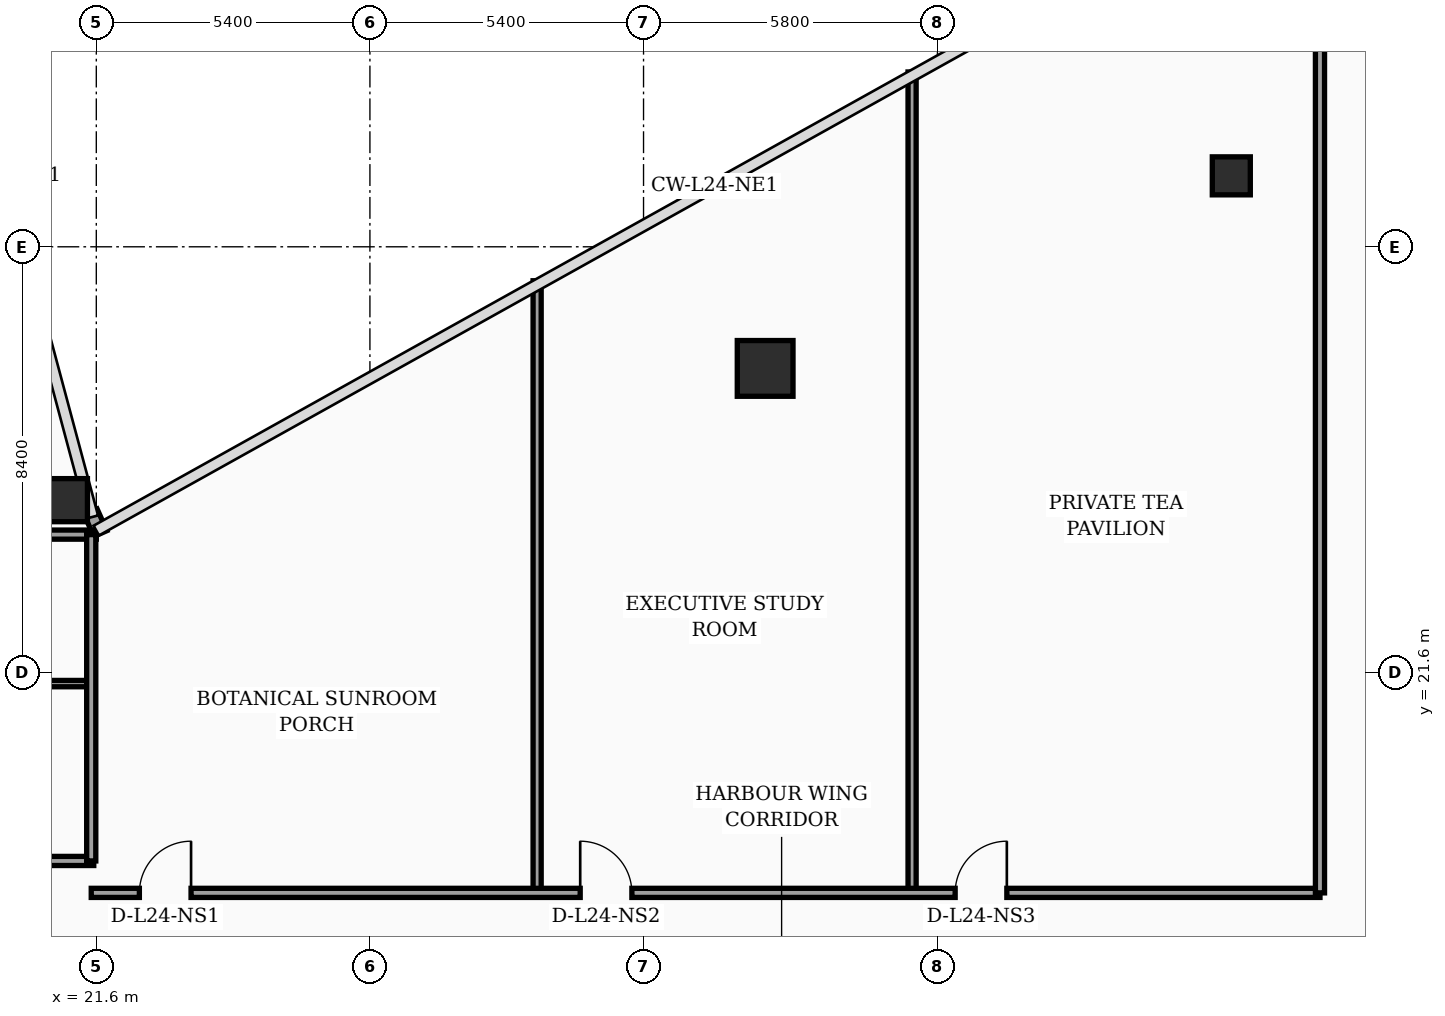
"""IFC4 building model, lengths in metres.
Left out: names, types, materials, properties, quantities, classifications, styles, units other than length and angle.
Written with IfcOpenShell. Run it as: python <this file> out.ifc"""

import sys

from ifc_helpers import new_model, si_unit, direction, frame, frame_2d, origin, origin_2d, place, context, subcontext, project, spatial, rectangle, hollow_rectangle, circle, extrude, element, fill, save


model = new_model("IFC4")
c1 = context("Model", 3, precision=1e-05, world=origin(), true_north=direction((0.0, 1.0)))
c2 = subcontext(c1, "Body", "Model", "MODEL_VIEW")
j1 = project(units=[si_unit("LENGTHUNIT", "METRE"), si_unit("PLANEANGLEUNIT", "RADIAN")], contexts=[c1])
p1 = place(None, origin())
s1 = spatial("IfcSite", under=j1, at=p1, CompositionType="ELEMENT")
p2 = place(p1, origin())
s2 = spatial("IfcBuilding", under=s1, at=p2, CompositionType="ELEMENT")
p3 = place(p2, frame((0.0, 0.0, 101.2)))
s3 = spatial("IfcBuildingStorey", under=s2, at=p3, CompositionType="ELEMENT", Elevation=101.2)
p4 = place(p3, frame((21.0, 25.0, 0.0), z_axis=(0.0, 0.0, 1.0), x_axis=(1.0, 0.0, 0.0)))
e1 = element("IfcColumn", 1, at=p4, inside=s3, PredefinedType="COLUMN", context=c2, shape_type="SweptSolid", body=[
    extrude(hollow_rectangle(XDim=0.85, YDim=0.85, WallThickness=0.036, at=origin_2d()), origin(), (0.0, 0.0, 1.0), 3.56),
])
p5 = place(p3, frame((34.8, 27.6, 0.0), z_axis=(0.0, 0.0, 1.0), x_axis=(1.0, 0.0, 0.0)))
e2 = element("IfcColumn", 2, at=p5, inside=s3, PredefinedType="COLUMN", context=c2, shape_type="SweptSolid", body=[
    extrude(circle(Radius=0.55, at=origin_2d()), origin(), (0.0, 0.0, 1.0), 3.56),
])
p6 = place(p3, frame((44.0, 31.4, 0.0), z_axis=(0.0, 0.0, 1.0), x_axis=(1.0, 0.0, 0.0)))
e3 = element("IfcColumn", 3, at=p6, inside=s3, PredefinedType="COLUMN", context=c2, shape_type="SweptSolid", body=[
    extrude(hollow_rectangle(XDim=0.75, YDim=0.75, WallThickness=0.032, at=origin_2d()), origin(), (0.0, 0.0, 1.0), 3.56),
])
p7 = place(p3, frame((21.68, 24.34, 0.0), z_axis=(0.0, 0.0, 1.0), x_axis=(-0.40758134973, 0.913168901875, 0.0)))
e4 = element("IfcWall", 4, at=p7, inside=s3, PredefinedType="SOLIDWALL", context=c2, shape_type="SweptSolid", body=[
    extrude(rectangle(XDim=0.471, YDim=0.28, at=frame_2d((0.235, 0.0))), origin(), (0.0, 0.0, 1.0), 3.56),
])
p8 = place(p3, frame((17.65, 17.88, 0.0), z_axis=(0.0, 0.0, 1.0), x_axis=(1.0, 0.0, 0.0)))
e5 = element("IfcWall", 5, at=p8, inside=s3, PredefinedType="PARTITIONING", context=c2, shape_type="SweptSolid", body=[
    extrude(rectangle(XDim=3.9, YDim=0.18, at=frame_2d((1.95, 0.0))), origin(), (0.0, 0.0, 1.0), 3.09),
])
p9 = place(p3, frame((17.65, 21.38, 0.0), z_axis=(0.0, 0.0, 1.0), x_axis=(1.0, 0.0, 0.0)))
e6 = element("IfcWall", 6, at=p9, inside=s3, PredefinedType="PARTITIONING", context=c2, shape_type="SweptSolid", body=[
    extrude(rectangle(XDim=3.9, YDim=0.125, at=frame_2d((1.95, 0.0))), origin(), (0.0, 0.0, 1.0), 3.56),
])
p10 = place(p3, frame((17.65, 24.32, 0.0), z_axis=(0.0, 0.0, 1.0), x_axis=(1.0, 0.0, 0.0)))
e7 = element("IfcWall", 7, at=p10, inside=s3, PredefinedType="PARTITIONING", context=c2, shape_type="SweptSolid", body=[
    extrude(rectangle(XDim=3.95, YDim=0.18, at=frame_2d((1.975, 0.0))), origin(), (0.0, 0.0, 1.0), 3.56),
])
p11 = place(p3, frame((21.5, 17.88, 0.0), z_axis=(0.0, 0.0, 1.0), x_axis=(0.0, 1.0, 0.0)))
e8 = element("IfcWall", 8, at=p11, inside=s3, PredefinedType="PARTITIONING", context=c2, shape_type="SweptSolid", body=[
    extrude(rectangle(XDim=6.44, YDim=0.18, at=frame_2d((3.22, 0.0))), origin(), (0.0, 0.0, 1.0), 3.09),
])
p12 = place(p3, frame((30.3, 17.25, 0.0), z_axis=(0.0, 0.0, 1.0), x_axis=(0.0, 1.0, 0.0)))
e9 = element("IfcWall", 9, at=p12, inside=s3, PredefinedType="PARTITIONING", context=c2, shape_type="SweptSolid", body=[
    extrude(rectangle(XDim=12.08, YDim=0.16, at=frame_2d((6.04, 0.0))), origin(), (0.0, 0.0, 1.0), 2.84),
])
p13 = place(p3, frame((37.7, 17.25, 0.0), z_axis=(0.0, 0.0, 1.0), x_axis=(0.0, 1.0, 0.0)))
e10 = element("IfcWall", 10, at=p13, inside=s3, PredefinedType="PARTITIONING", context=c2, shape_type="SweptSolid", body=[
    extrude(rectangle(XDim=16.2, YDim=0.16, at=frame_2d((8.1, 0.0))), origin(), (0.0, 0.0, 1.0), 2.84),
])
p14 = place(p3, frame((21.5, 17.25, 0.0), z_axis=(0.0, 0.0, 1.0), x_axis=(1.0, 0.0, 0.0)))
e11 = element("IfcWall", 11, at=p14, inside=s3, PredefinedType="PARTITIONING", context=c2, shape_type="SweptSolid", body=[
    extrude(rectangle(XDim=24.25, YDim=0.18, at=frame_2d((12.125, 0.0))), origin(), (0.0, 0.0, 1.0), 2.84),
])
p15 = place(p14, frame((0.95, 0.0, 0.0)))
e12 = element("IfcOpeningElement", 12, at=p15, cuts=e11, PredefinedType="OPENING", context=c2, shape_type="SweptSolid", body=[
    extrude(rectangle(XDim=1.02, YDim=2.2, at=frame_2d((0.51, 1.1))), frame((0.0, 0.1, 0.0), z_axis=(0.0, -1.0, 0.0), x_axis=(1.0, 0.0, 0.0)), (0.0, 0.0, 1.0), 0.2),
])
p16 = place(p14, frame((9.65, 0.0, 0.0)))
e13 = element("IfcOpeningElement", 13, at=p16, cuts=e11, PredefinedType="OPENING", context=c2, shape_type="SweptSolid", body=[
    extrude(rectangle(XDim=1.02, YDim=2.2, at=frame_2d((0.51, 1.1))), frame((0.0, 0.1, 0.0), z_axis=(0.0, -1.0, 0.0), x_axis=(1.0, 0.0, 0.0)), (0.0, 0.0, 1.0), 0.2),
])
p17 = place(p14, frame((17.05, 0.0, 0.0)))
e14 = element("IfcOpeningElement", 14, at=p17, cuts=e11, PredefinedType="OPENING", context=c2, shape_type="SweptSolid", body=[
    extrude(rectangle(XDim=1.02, YDim=2.2, at=frame_2d((0.51, 1.1))), frame((0.0, 0.1, 0.0), z_axis=(0.0, -1.0, 0.0), x_axis=(1.0, 0.0, 0.0)), (0.0, 0.0, 1.0), 0.2),
])
p18 = place(p3, frame((45.75, 17.25, 0.0), z_axis=(0.0, 0.0, 1.0), x_axis=(0.0, 1.0, 0.0)))
e15 = element("IfcWall", 15, at=p18, inside=s3, PredefinedType="PARTITIONING", context=c2, shape_type="SweptSolid", body=[
    extrude(rectangle(XDim=20.69, YDim=0.18, at=frame_2d((10.345, 0.0))), origin(), (0.0, 0.0, 1.0), 2.84),
])
p19 = place(p15, origin())
e16 = element("IfcDoor", 16, at=p19, inside=s3, OperationType="SINGLE_SWING_RIGHT", PredefinedType="DOOR", context=c2, shape_type="SweptSolid", body=[
    extrude(rectangle(XDim=1.02, YDim=2.2, at=frame_2d((0.51, 1.1))), frame((0.0, 0.025, 0.0), z_axis=(0.0, -1.0, 0.0), x_axis=(1.0, 0.0, 0.0)), (0.0, 0.0, 1.0), 0.05),
])
fill(e12, e16)
p20 = place(p16, origin())
e17 = element("IfcDoor", 17, at=p20, inside=s3, OperationType="SINGLE_SWING_LEFT", PredefinedType="DOOR", context=c2, shape_type="SweptSolid", body=[
    extrude(rectangle(XDim=1.02, YDim=2.2, at=frame_2d((0.51, 1.1))), frame((0.0, 0.025, 0.0), z_axis=(0.0, -1.0, 0.0), x_axis=(1.0, 0.0, 0.0)), (0.0, 0.0, 1.0), 0.05),
])
fill(e13, e17)
p21 = place(p17, origin())
e18 = element("IfcDoor", 18, at=p21, inside=s3, OperationType="SINGLE_SWING_RIGHT", PredefinedType="DOOR", context=c2, shape_type="SweptSolid", body=[
    extrude(rectangle(XDim=1.02, YDim=2.2, at=frame_2d((0.51, 1.1))), frame((0.0, 0.025, 0.0), z_axis=(0.0, -1.0, 0.0), x_axis=(1.0, 0.0, 0.0)), (0.0, 0.0, 1.0), 0.05),
])
fill(e14, e18)
save(model, sys.argv[1])
